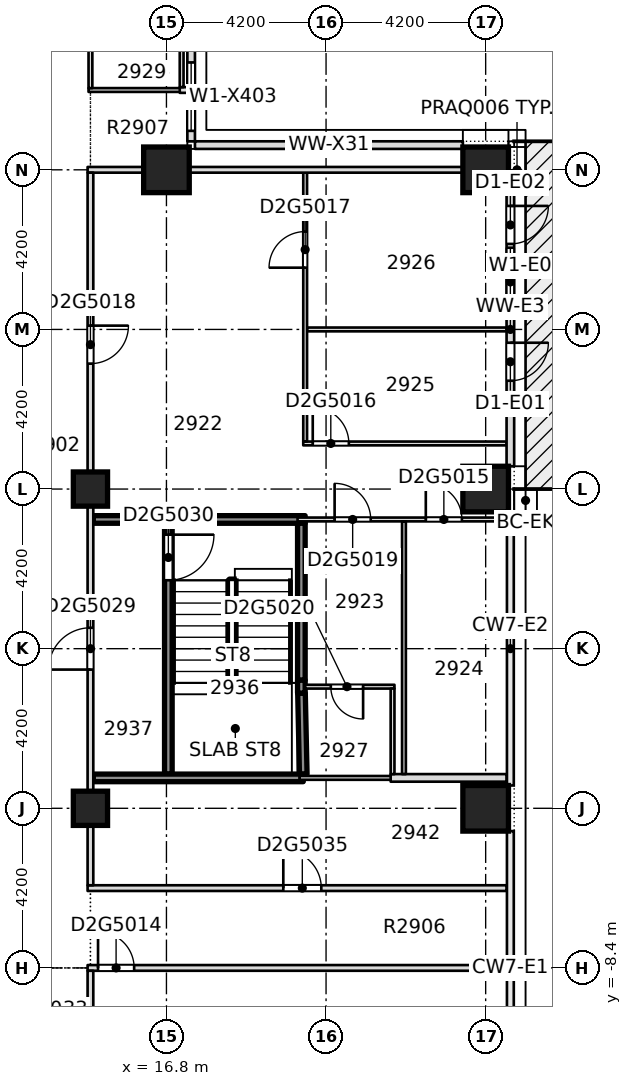
"""IFC4 building model, lengths in metres.
Left out: names, types, materials, properties, quantities, classifications, styles, units other than length and angle.
Written with IfcOpenShell. Run it as: python <this file> out.ifc"""

import sys

from ifc_helpers import new_model, si_unit, direction, frame, frame_2d, origin, origin_2d, place, context, subcontext, project, spatial, rectangle, extrude, element, fill, save


model = new_model("IFC4")
c1 = context("Model", 3, precision=1e-05, world=origin(), true_north=direction((0.0, 1.0)))
c2 = subcontext(c1, "Body", "Model", "MODEL_VIEW")
j1 = project(units=[si_unit("LENGTHUNIT", "METRE"), si_unit("PLANEANGLEUNIT", "RADIAN")], contexts=[c1])
p1 = place(None, origin())
s1 = spatial("IfcSite", under=j1, at=p1, CompositionType="ELEMENT")
p2 = place(p1, origin())
s2 = spatial("IfcBuilding", under=s1, at=p2, CompositionType="ELEMENT")
p3 = place(p2, frame((0.0, 0.0, 114.9)))
s3 = spatial("IfcBuildingStorey", under=s2, at=p3, CompositionType="ELEMENT", Elevation=114.9)
for number, where, z_axis, x_axis in (
    (1, (25.2, -4.2, -0.32), (0.0, 0.0, 1.0), (1.0, 0.0, 0.0)),
    (2, (25.2, 4.2, -0.32), (0.0, 0.0, 1.0), (1.0, 0.0, 0.0)),
    (3, (16.8, 12.6, -0.32), (0.0, 0.0, 1.0), (1.0, 0.0, 0.0)),
    (4, (25.2, 12.6, -0.32), (0.0, 0.0, 1.0), (1.0, 0.0, 0.0)),
):
    element("IfcColumn", number, at=place(p3, frame(where, z_axis=z_axis, x_axis=x_axis)), inside=s3, PredefinedType="COLUMN", context=c2, shape_type="SweptSolid", body=[
        extrude(rectangle(XDim=1.2, YDim=1.2, at=origin_2d()), origin(), (0.0, 0.0, 1.0), 3.45),
    ])
for number, where, z_axis, x_axis in (
    (5, (14.8, -4.2, -0.32), (0.0, 0.0, 1.0), (1.0, 0.0, 0.0)),
    (6, (14.8, 4.2, -0.32), (0.0, 0.0, 1.0), (1.0, 0.0, 0.0)),
):
    element("IfcColumn", number, at=place(p3, frame(where, z_axis=z_axis, x_axis=x_axis)), inside=s3, PredefinedType="COLUMN", context=c2, shape_type="SweptSolid", body=[
        extrude(rectangle(XDim=0.9, YDim=0.9, at=origin_2d()), origin(), (0.0, 0.0, 1.0), 3.45),
    ])
p4 = place(p3, frame((14.725, -8.4, 0.0), z_axis=(0.0, 0.0, 1.0), x_axis=(1.0, 0.0, 0.0)))
e7 = element("IfcWall", 7, at=p4, inside=s3, PredefinedType="PARTITIONING", context=c2, shape_type="SweptSolid", body=[
    extrude(rectangle(XDim=11.025, YDim=0.15, at=frame_2d((5.512, 0.0))), origin(), (0.0, 0.0, 1.0), 3.13),
])
p5 = place(p4, frame((0.275, 0.0, 0.0)))
e8 = element("IfcOpeningElement", 8, at=p5, cuts=e7, PredefinedType="OPENING", context=c2, shape_type="SweptSolid", body=[
    extrude(rectangle(XDim=0.95, YDim=2.1, at=frame_2d((0.475, 1.05))), frame((0.0, 0.085, 0.0), z_axis=(0.0, -1.0, 0.0), x_axis=(1.0, 0.0, 0.0)), (0.0, 0.0, 1.0), 0.17),
])
p6 = place(p3, frame((14.725, -6.3, 0.0), z_axis=(0.0, 0.0, 1.0), x_axis=(1.0, 0.0, 0.0)))
e9 = element("IfcWall", 9, at=p6, inside=s3, PredefinedType="PARTITIONING", context=c2, shape_type="SweptSolid", body=[
    extrude(rectangle(XDim=11.025, YDim=0.15, at=frame_2d((5.512, 0.0))), origin(), (0.0, 0.0, 1.0), 3.13),
])
p7 = place(p6, frame((5.15, 0.0, 0.0)))
e10 = element("IfcOpeningElement", 10, at=p7, cuts=e9, PredefinedType="OPENING", context=c2, shape_type="SweptSolid", body=[
    extrude(rectangle(XDim=1.0, YDim=2.1, at=frame_2d((0.5, 1.05))), frame((0.0, 0.085, 0.0), z_axis=(0.0, -1.0, 0.0), x_axis=(1.0, 0.0, 0.0)), (0.0, 0.0, 1.0), 0.17),
])
p8 = place(p3, frame((20.3, -3.4, 0.0), z_axis=(0.0, 0.0, 1.0), x_axis=(1.0, 0.0, 0.0)))
e11 = element("IfcWall", 11, at=p8, inside=s3, PredefinedType="PARTITIONING", context=c2, shape_type="SweptSolid", body=[
    extrude(rectangle(XDim=2.5, YDim=0.1, at=frame_2d((1.25, 0.0))), origin(), (0.0, 0.0, 1.0), 3.13),
])
p9 = place(p3, frame((22.7, -3.4, 0.0), z_axis=(0.0, 0.0, 1.0), x_axis=(1.0, 0.0, 0.0)))
e12 = element("IfcWall", 12, at=p9, inside=s3, PredefinedType="PARTITIONING", context=c2, shape_type="SweptSolid", body=[
    extrude(rectangle(XDim=3.05, YDim=0.2, at=frame_2d((1.525, 0.0))), origin(), (0.0, 0.0, 1.0), 3.13),
])
p10 = place(p3, frame((20.45, -1.0, 0.0), z_axis=(0.0, 0.0, 1.0), x_axis=(1.0, 0.0, 0.0)))
e13 = element("IfcWall", 13, at=p10, inside=s3, PredefinedType="PARTITIONING", context=c2, shape_type="SweptSolid", body=[
    extrude(rectangle(XDim=2.35, YDim=0.1, at=frame_2d((1.175, 0.0))), origin(), (0.0, 0.0, 1.0), 3.13),
])
p11 = place(p10, frame((0.675, 0.0, 0.0)))
e14 = element("IfcOpeningElement", 14, at=p11, cuts=e13, PredefinedType="OPENING", context=c2, shape_type="SweptSolid", body=[
    extrude(rectangle(XDim=0.85, YDim=2.1, at=frame_2d((0.425, 1.05))), frame((0.0, 0.06, 0.0), z_axis=(0.0, -1.0, 0.0), x_axis=(1.0, 0.0, 0.0)), (0.0, 0.0, 1.0), 0.12),
])
p12 = place(p3, frame((14.875, 3.4, 0.0), z_axis=(0.0, 0.0, 1.0), x_axis=(1.0, 0.0, 0.0)))
e15 = element("IfcWall", 15, at=p12, inside=s3, PredefinedType="SOLIDWALL", context=c2, shape_type="SweptSolid", body=[
    extrude(rectangle(XDim=5.575, YDim=0.2, at=frame_2d((2.788, 0.0))), origin(), (0.0, 0.0, 1.0), 3.13),
])
p13 = place(p3, frame((20.25, 3.4, 0.0), z_axis=(0.0, 0.0, 1.0), x_axis=(1.0, 0.0, 0.0)))
e16 = element("IfcWall", 16, at=p13, inside=s3, PredefinedType="PARTITIONING", context=c2, shape_type="SweptSolid", body=[
    extrude(rectangle(XDim=5.5, YDim=0.1, at=frame_2d((2.75, 0.0))), origin(), (0.0, 0.0, 1.0), 3.13),
])
p14 = place(p13, frame((3.375, 0.0, 0.0)))
e17 = element("IfcOpeningElement", 17, at=p14, cuts=e16, PredefinedType="OPENING", context=c2, shape_type="SweptSolid", body=[
    extrude(rectangle(XDim=0.95, YDim=2.1, at=frame_2d((0.475, 1.05))), frame((0.0, 0.06, 0.0), z_axis=(0.0, -1.0, 0.0), x_axis=(1.0, 0.0, 0.0)), (0.0, 0.0, 1.0), 0.12),
])
p15 = place(p13, frame((0.975, 0.0, 0.0)))
e18 = element("IfcOpeningElement", 18, at=p15, cuts=e16, PredefinedType="OPENING", context=c2, shape_type="SweptSolid", body=[
    extrude(rectangle(XDim=0.95, YDim=2.1, at=frame_2d((0.475, 1.05))), frame((0.0, 0.06, 0.0), z_axis=(0.0, -1.0, 0.0), x_axis=(1.0, 0.0, 0.0)), (0.0, 0.0, 1.0), 0.12),
])
p16 = place(p3, frame((20.4, 5.4, 0.0), z_axis=(0.0, 0.0, 1.0), x_axis=(1.0, 0.0, 0.0)))
e19 = element("IfcWall", 19, at=p16, inside=s3, PredefinedType="PARTITIONING", context=c2, shape_type="SweptSolid", body=[
    extrude(rectangle(XDim=5.35, YDim=0.1, at=frame_2d((2.675, 0.0))), origin(), (0.0, 0.0, 1.0), 3.13),
])
p17 = place(p16, frame((0.25, 0.0, 0.0)))
e20 = element("IfcOpeningElement", 20, at=p17, cuts=e19, PredefinedType="OPENING", context=c2, shape_type="SweptSolid", body=[
    extrude(rectangle(XDim=0.95, YDim=2.1, at=frame_2d((0.475, 1.05))), frame((0.0, 0.06, 0.0), z_axis=(0.0, -1.0, 0.0), x_axis=(1.0, 0.0, 0.0)), (0.0, 0.0, 1.0), 0.12),
])
p18 = place(p3, frame((20.5, 8.4, 0.0), z_axis=(0.0, 0.0, 1.0), x_axis=(1.0, 0.0, 0.0)))
e21 = element("IfcWall", 21, at=p18, inside=s3, PredefinedType="PARTITIONING", context=c2, shape_type="SweptSolid", body=[
    extrude(rectangle(XDim=5.25, YDim=0.1, at=frame_2d((2.625, 0.0))), origin(), (0.0, 0.0, 1.0), 3.13),
])
p19 = place(p3, frame((14.725, 12.6, 0.0), z_axis=(0.0, 0.0, 1.0), x_axis=(1.0, 0.0, 0.0)))
e22 = element("IfcWall", 22, at=p19, inside=s3, PredefinedType="PARTITIONING", context=c2, shape_type="SweptSolid", body=[
    extrude(rectangle(XDim=2.675, YDim=0.15, at=frame_2d((1.337, 0.0))), origin(), (0.0, 0.0, 1.0), 3.13),
])
p20 = place(p3, frame((14.75, 14.7, 0.0), z_axis=(0.0, 0.0, 1.0), x_axis=(1.0, 0.0, 0.0)))
e23 = element("IfcWall", 23, at=p20, inside=s3, PredefinedType="PARTITIONING", context=c2, shape_type="SweptSolid", body=[
    extrude(rectangle(XDim=2.5, YDim=0.1, at=frame_2d((1.25, 0.0))), origin(), (0.0, 0.0, 1.0), 3.13),
])
p21 = place(p3, frame((17.15, 14.7, 0.0), z_axis=(0.0, 0.0, 1.0), x_axis=(1.0, 0.0, 0.0)))
e24 = element("IfcWall", 24, at=p21, inside=s3, PredefinedType="PARTITIONING", context=c2, shape_type="SweptSolid", body=[
    extrude(rectangle(XDim=0.2, YDim=0.15, at=frame_2d((0.1, 0.0))), origin(), (0.0, 0.0, 1.0), 3.13),
])
p22 = place(p3, frame((14.8, -10.525, 0.0), z_axis=(0.0, 0.0, 1.0), x_axis=(0.0, 1.0, 0.0)))
e25 = element("IfcWall", 25, at=p22, inside=s3, PredefinedType="PARTITIONING", context=c2, shape_type="SweptSolid", body=[
    extrude(rectangle(XDim=2.05, YDim=0.15, at=frame_2d((1.025, 0.0))), origin(), (0.0, 0.0, 1.0), 3.13),
])
p23 = place(p3, frame((14.8, -6.225, 0.0), z_axis=(0.0, 0.0, 1.0), x_axis=(0.0, 1.0, 0.0)))
e26 = element("IfcWall", 26, at=p23, inside=s3, PredefinedType="PARTITIONING", context=c2, shape_type="SweptSolid", body=[
    extrude(rectangle(XDim=18.75, YDim=0.15, at=frame_2d((9.375, 0.0))), origin(), (0.0, 0.0, 1.0), 3.13),
])
p24 = place(p23, frame((13.725, 0.0, 0.0)))
e27 = element("IfcOpeningElement", 27, at=p24, cuts=e26, PredefinedType="OPENING", context=c2, shape_type="SweptSolid", body=[
    extrude(rectangle(XDim=1.0, YDim=2.1, at=frame_2d((0.5, 1.05))), frame((0.0, 0.085, 0.0), z_axis=(0.0, -1.0, 0.0), x_axis=(1.0, 0.0, 0.0)), (0.0, 0.0, 1.0), 0.17),
])
p25 = place(p23, frame((5.675, 0.0, 0.0)))
e28 = element("IfcOpeningElement", 28, at=p25, cuts=e26, PredefinedType="OPENING", context=c2, shape_type="SweptSolid", body=[
    extrude(rectangle(XDim=1.1, YDim=2.1, at=frame_2d((0.55, 1.05))), frame((0.0, 0.085, 0.0), z_axis=(0.0, -1.0, 0.0), x_axis=(1.0, 0.0, 0.0)), (0.0, 0.0, 1.0), 0.17),
])
p26 = place(p3, frame((14.8, 14.75, 0.0), z_axis=(0.0, 0.0, 1.0), x_axis=(0.0, 1.0, 0.0)))
e29 = element("IfcWall", 29, at=p26, inside=s3, PredefinedType="PARTITIONING", context=c2, shape_type="SweptSolid", body=[
    extrude(rectangle(XDim=1.7, YDim=0.1, at=frame_2d((0.85, 0.0))), origin(), (0.0, 0.0, 1.0), 3.13),
])
p27 = place(p3, frame((16.85, -3.3, 0.0), z_axis=(0.0, 0.0, 1.0), x_axis=(0.0, 1.0, 0.0)))
e30 = element("IfcWall", 30, at=p27, inside=s3, PredefinedType="SOLIDWALL", context=c2, shape_type="SweptSolid", body=[
    extrude(rectangle(XDim=6.6, YDim=0.2, at=frame_2d((3.3, 0.0))), origin(), (0.0, 0.0, 1.0), 3.13),
])
p28 = place(p27, frame((5.1, 0.0, 0.0)))
e31 = element("IfcOpeningElement", 31, at=p28, cuts=e30, PredefinedType="OPENING", context=c2, shape_type="SweptSolid", body=[
    extrude(rectangle(XDim=1.2, YDim=2.1, at=frame_2d((0.6, 1.05))), frame((0.0, 0.11, 0.0), z_axis=(0.0, -1.0, 0.0), x_axis=(1.0, 0.0, 0.0)), (0.0, 0.0, 1.0), 0.22),
])
p29 = place(p3, frame((17.2, 14.775, 0.0), z_axis=(0.0, 0.0, 1.0), x_axis=(0.0, 1.0, 0.0)))
e32 = element("IfcWall", 32, at=p29, inside=s3, PredefinedType="PARTITIONING", context=c2, shape_type="SweptSolid", body=[
    extrude(rectangle(XDim=1.675, YDim=0.1, at=frame_2d((0.837, 0.0))), origin(), (0.0, 0.0, 1.0), 3.13),
])
p30 = place(p3, frame((20.4, -3.3, 0.0), z_axis=(0.0, 0.0, 1.0), x_axis=(-0.021771342749, 0.999762976227, 0.0)))
e33 = element("IfcWall", 33, at=p30, inside=s3, PredefinedType="SOLIDWALL", context=c2, shape_type="SweptSolid", body=[
    extrude(rectangle(XDim=2.131, YDim=0.2, at=frame_2d((1.065, 0.0))), origin(), (0.0, 0.0, 1.0), 3.13),
])
p31 = place(p3, frame((20.35, -0.83, 0.0), z_axis=(0.0, 0.0, 1.0), x_axis=(0.0, 1.0, 0.0)))
e34 = element("IfcWall", 34, at=p31, inside=s3, PredefinedType="SOLIDWALL", context=c2, shape_type="SweptSolid", body=[
    extrude(rectangle(XDim=4.13, YDim=0.2, at=frame_2d((2.065, 0.0))), origin(), (0.0, 0.0, 1.0), 3.13),
])
p32 = place(p3, frame((20.45, 5.45, 0.0), z_axis=(0.0, 0.0, 1.0), x_axis=(0.0, 1.0, 0.0)))
e35 = element("IfcWall", 35, at=p32, inside=s3, PredefinedType="PARTITIONING", context=c2, shape_type="SweptSolid", body=[
    extrude(rectangle(XDim=7.075, YDim=0.1, at=frame_2d((3.538, 0.0))), origin(), (0.0, 0.0, 1.0), 3.13),
])
p33 = place(p32, frame((4.575, 0.0, 0.0)))
e36 = element("IfcOpeningElement", 36, at=p33, cuts=e35, PredefinedType="OPENING", context=c2, shape_type="SweptSolid", body=[
    extrude(rectangle(XDim=0.95, YDim=2.1, at=frame_2d((0.475, 1.05))), frame((0.0, 0.06, 0.0), z_axis=(0.0, -1.0, 0.0), x_axis=(1.0, 0.0, 0.0)), (0.0, 0.0, 1.0), 0.12),
])
p34 = place(p3, frame((22.75, -3.3, 0.0), z_axis=(0.0, 0.0, 1.0), x_axis=(0.0, 1.0, 0.0)))
e37 = element("IfcWall", 37, at=p34, inside=s3, PredefinedType="PARTITIONING", context=c2, shape_type="SweptSolid", body=[
    extrude(rectangle(XDim=2.25, YDim=0.1, at=frame_2d((1.125, 0.0))), origin(), (0.0, 0.0, 1.0), 3.13),
])
p35 = place(p3, frame((23.05, -3.3, 0.0), z_axis=(0.0, 0.0, 1.0), x_axis=(0.0, 1.0, 0.0)))
e38 = element("IfcWall", 38, at=p35, inside=s3, PredefinedType="PARTITIONING", context=c2, shape_type="SweptSolid", body=[
    extrude(rectangle(XDim=6.65, YDim=0.1, at=frame_2d((3.325, 0.0))), origin(), (0.0, 0.0, 1.0), 3.13),
])
p36 = place(p3, frame((25.85, 4.8, 0.0), z_axis=(0.0, 0.0, 1.0), x_axis=(0.0, 1.0, 0.0)))
e39 = element("IfcWall", 39, at=p36, inside=s3, PredefinedType="STANDARD", context=c2, shape_type="SweptSolid", body=[
    extrude(rectangle(XDim=7.2, YDim=0.2, at=frame_2d((3.6, 0.0))), origin(), (0.0, 0.0, 1.0), 3.13),
])
p37 = place(p36, frame((2.25, 0.0, 0.0)))
e40 = element("IfcOpeningElement", 40, at=p37, cuts=e39, PredefinedType="OPENING", context=c2, shape_type="SweptSolid", body=[
    extrude(rectangle(XDim=1.0, YDim=2.4, at=frame_2d((0.5, 1.2))), frame((0.0, 0.11, 0.0), z_axis=(0.0, -1.0, 0.0), x_axis=(1.0, 0.0, 0.0)), (0.0, 0.0, 1.0), 0.22),
])
p38 = place(p36, frame((3.95, 0.0, 0.2)))
e41 = element("IfcOpeningElement", 41, at=p38, cuts=e39, PredefinedType="OPENING", context=c2, shape_type="SweptSolid", body=[
    extrude(rectangle(XDim=1.8, YDim=2.65, at=frame_2d((0.9, 1.325))), frame((0.0, 0.11, 0.0), z_axis=(0.0, -1.0, 0.0), x_axis=(1.0, 0.0, 0.0)), (0.0, 0.0, 1.0), 0.22),
])
p39 = place(p36, frame((5.85, 0.0, 0.0)))
e42 = element("IfcOpeningElement", 42, at=p39, cuts=e39, PredefinedType="OPENING", context=c2, shape_type="SweptSolid", body=[
    extrude(rectangle(XDim=1.0, YDim=2.4, at=frame_2d((0.5, 1.2))), frame((0.0, 0.11, 0.0), z_axis=(0.0, -1.0, 0.0), x_axis=(1.0, 0.0, 0.0)), (0.0, 0.0, 1.0), 0.22),
])
p40 = place(p3, frame((24.6, 13.25, 0.0), z_axis=(0.0, 0.0, 1.0), x_axis=(-1.0, 0.0, 0.0)))
e43 = element("IfcWall", 43, at=p40, inside=s3, PredefinedType="STANDARD", context=c2, shape_type="SweptSolid", body=[
    extrude(rectangle(XDim=7.05, YDim=0.2, at=frame_2d((3.525, 0.0))), origin(), (0.0, 0.0, 1.0), 3.13),
])
p41 = place(p3, frame((17.45, 13.35, 0.0), z_axis=(0.0, 0.0, 1.0), x_axis=(0.0, 1.0, 0.0)))
e44 = element("IfcWall", 44, at=p41, inside=s3, PredefinedType="STANDARD", context=c2, shape_type="SweptSolid", body=[
    extrude(rectangle(XDim=7.05, YDim=0.2, at=frame_2d((3.525, 0.0))), origin(), (0.0, 0.0, 1.0), 3.13),
])
p42 = place(p41, frame((0.275, 0.0, 0.2)))
e45 = element("IfcOpeningElement", 45, at=p42, cuts=e44, PredefinedType="OPENING", context=c2, shape_type="SweptSolid", body=[
    extrude(rectangle(XDim=1.8, YDim=2.65, at=frame_2d((0.9, 1.325))), frame((0.0, 0.11, 0.0), z_axis=(0.0, -1.0, 0.0), x_axis=(1.0, 0.0, 0.0)), (0.0, 0.0, 1.0), 0.22),
])
p43 = place(p41, frame((3.8, 0.0, 0.2)))
e46 = element("IfcOpeningElement", 46, at=p43, cuts=e44, PredefinedType="OPENING", context=c2, shape_type="SweptSolid", body=[
    extrude(rectangle(XDim=1.8, YDim=2.65, at=frame_2d((0.9, 1.325))), frame((0.0, 0.11, 0.0), z_axis=(0.0, -1.0, 0.0), x_axis=(1.0, 0.0, 0.0)), (0.0, 0.0, 1.0), 0.22),
])
p44 = place(p3, frame((20.35, -1.17, 0.0), z_axis=(0.0, 0.0, 1.0), x_axis=(0.0, 1.0, 0.0)))
e47 = element("IfcWall", 47, at=p44, inside=s3, PredefinedType="SOLIDWALL", context=c2, shape_type="SweptSolid", body=[
    extrude(rectangle(XDim=0.34, YDim=0.2, at=frame_2d((0.17, 0.0))), origin(), (0.0, 0.0, 1.0), 3.13),
])
p45 = place(p3, frame((14.875, -3.4, 0.0), z_axis=(0.0, 0.0, 1.0), x_axis=(1.0, 0.0, 0.0)))
e48 = element("IfcWall", 48, at=p45, inside=s3, PredefinedType="SOLIDWALL", context=c2, shape_type="SweptSolid", body=[
    extrude(rectangle(XDim=5.525, YDim=0.2, at=frame_2d((2.762, 0.0))), origin(), (0.0, 0.0, 1.0), 3.13),
])
p46 = place(p3, frame((17.4, 12.6, 0.0), z_axis=(0.0, 0.0, 1.0), x_axis=(1.0, 0.0, 0.0)))
e49 = element("IfcWall", 49, at=p46, inside=s3, PredefinedType="PARTITIONING", context=c2, shape_type="SweptSolid", body=[
    extrude(rectangle(XDim=7.2, YDim=0.15, at=frame_2d((3.6, 0.0))), origin(), (0.0, 0.0, 1.0), 2.58),
])
p47 = place(p3, frame((24.6, 12.6, 0.0), z_axis=(0.0, 0.0, 1.0), x_axis=(1.0, 0.0, 0.0)))
e50 = element("IfcWall", 50, at=p47, inside=s3, PredefinedType="PARTITIONING", context=c2, shape_type="SweptSolid", body=[
    extrude(rectangle(XDim=1.15, YDim=0.15, at=frame_2d((0.575, 0.0))), origin(), (0.0, 0.0, 1.0), 3.13),
])
p48 = place(p5, origin())
e51 = element("IfcDoor", 51, at=p48, inside=s3, OperationType="SINGLE_SWING_RIGHT", PredefinedType="DOOR", context=c2, shape_type="SweptSolid", body=[
    extrude(rectangle(XDim=0.95, YDim=2.1, at=frame_2d((0.475, 1.05))), frame((0.0, 0.025, 0.0), z_axis=(0.0, -1.0, 0.0), x_axis=(1.0, 0.0, 0.0)), (0.0, 0.0, 1.0), 0.05),
])
fill(e8, e51)
p49 = place(p14, origin())
e52 = element("IfcDoor", 52, at=p49, inside=s3, OperationType="SINGLE_SWING_RIGHT", PredefinedType="DOOR", context=c2, shape_type="SweptSolid", body=[
    extrude(rectangle(XDim=0.95, YDim=2.1, at=frame_2d((0.475, 1.05))), frame((0.0, 0.025, 0.0), z_axis=(0.0, -1.0, 0.0), x_axis=(1.0, 0.0, 0.0)), (0.0, 0.0, 1.0), 0.05),
])
fill(e17, e52)
p50 = place(p17, origin())
e53 = element("IfcDoor", 53, at=p50, inside=s3, OperationType="SINGLE_SWING_LEFT", PredefinedType="DOOR", context=c2, shape_type="SweptSolid", body=[
    extrude(rectangle(XDim=0.95, YDim=2.1, at=frame_2d((0.475, 1.05))), frame((0.0, 0.025, 0.0), z_axis=(0.0, -1.0, 0.0), x_axis=(1.0, 0.0, 0.0)), (0.0, 0.0, 1.0), 0.05),
])
fill(e20, e53)
p51 = place(p33, origin())
e54 = element("IfcDoor", 54, at=p51, inside=s3, OperationType="SINGLE_SWING_RIGHT", PredefinedType="DOOR", context=c2, shape_type="SweptSolid", body=[
    extrude(rectangle(XDim=0.95, YDim=2.1, at=frame_2d((0.475, 1.05))), frame((0.0, 0.025, 0.0), z_axis=(0.0, -1.0, 0.0), x_axis=(1.0, 0.0, 0.0)), (0.0, 0.0, 1.0), 0.05),
])
fill(e36, e54)
p52 = place(p24, origin())
e55 = element("IfcDoor", 55, at=p52, inside=s3, OperationType="SINGLE_SWING_RIGHT", PredefinedType="DOOR", context=c2, shape_type="SweptSolid", body=[
    extrude(rectangle(XDim=1.0, YDim=2.1, at=frame_2d((0.5, 1.05))), frame((0.0, 0.025, 0.0), z_axis=(0.0, -1.0, 0.0), x_axis=(1.0, 0.0, 0.0)), (0.0, 0.0, 1.0), 0.05),
])
fill(e27, e55)
p53 = place(p15, origin())
e56 = element("IfcDoor", 56, at=p53, inside=s3, OperationType="SINGLE_SWING_RIGHT", PredefinedType="DOOR", context=c2, shape_type="SweptSolid", body=[
    extrude(rectangle(XDim=0.95, YDim=2.1, at=frame_2d((0.475, 1.05))), frame((0.0, 0.025, 0.0), z_axis=(0.0, -1.0, 0.0), x_axis=(1.0, 0.0, 0.0)), (0.0, 0.0, 1.0), 0.05),
])
fill(e18, e56)
p54 = place(p11, origin())
e57 = element("IfcDoor", 57, at=p54, inside=s3, OperationType="SINGLE_SWING_RIGHT", PredefinedType="DOOR", context=c2, shape_type="SweptSolid", body=[
    extrude(rectangle(XDim=0.85, YDim=2.1, at=frame_2d((0.425, 1.05))), frame((0.0, 0.025, 0.0), z_axis=(0.0, -1.0, 0.0), x_axis=(1.0, 0.0, 0.0)), (0.0, 0.0, 1.0), 0.05),
])
fill(e14, e57)
p55 = place(p25, origin())
e58 = element("IfcDoor", 58, at=p55, inside=s3, OperationType="SINGLE_SWING_LEFT", PredefinedType="DOOR", context=c2, shape_type="SweptSolid", body=[
    extrude(rectangle(XDim=1.1, YDim=2.1, at=frame_2d((0.55, 1.05))), frame((0.0, 0.025, 0.0), z_axis=(0.0, -1.0, 0.0), x_axis=(1.0, 0.0, 0.0)), (0.0, 0.0, 1.0), 0.05),
])
fill(e28, e58)
p56 = place(p28, origin())
e59 = element("IfcDoor", 59, at=p56, inside=s3, OperationType="SINGLE_SWING_LEFT", PredefinedType="DOOR", context=c2, shape_type="SweptSolid", body=[
    extrude(rectangle(XDim=1.2, YDim=2.1, at=frame_2d((0.6, 1.05))), frame((0.0, 0.025, 0.0), z_axis=(0.0, -1.0, 0.0), x_axis=(1.0, 0.0, 0.0)), (0.0, 0.0, 1.0), 0.05),
])
fill(e31, e59)
p57 = place(p7, origin())
e60 = element("IfcDoor", 60, at=p57, inside=s3, OperationType="SINGLE_SWING_RIGHT", PredefinedType="DOOR", context=c2, shape_type="SweptSolid", body=[
    extrude(rectangle(XDim=1.0, YDim=2.1, at=frame_2d((0.5, 1.05))), frame((0.0, 0.025, 0.0), z_axis=(0.0, -1.0, 0.0), x_axis=(1.0, 0.0, 0.0)), (0.0, 0.0, 1.0), 0.05),
])
fill(e10, e60)
p58 = place(p37, origin())
e61 = element("IfcDoor", 61, at=p58, inside=s3, OperationType="SINGLE_SWING_LEFT", PredefinedType="DOOR", context=c2, shape_type="SweptSolid", body=[
    extrude(rectangle(XDim=1.0, YDim=2.4, at=frame_2d((0.5, 1.2))), frame((0.0, 0.025, 0.0), z_axis=(0.0, -1.0, 0.0), x_axis=(1.0, 0.0, 0.0)), (0.0, 0.0, 1.0), 0.05),
])
fill(e40, e61)
p59 = place(p38, origin())
e62 = element("IfcWindow", 62, at=p59, inside=s3, PartitioningType="SINGLE_PANEL", PredefinedType="WINDOW", context=c2, shape_type="SweptSolid", body=[
    extrude(rectangle(XDim=1.8, YDim=2.65, at=frame_2d((0.9, 1.325))), frame((0.0, 0.03, 0.0), z_axis=(0.0, -1.0, 0.0), x_axis=(1.0, 0.0, 0.0)), (0.0, 0.0, 1.0), 0.06),
])
fill(e41, e62)
p60 = place(p39, origin())
e63 = element("IfcDoor", 63, at=p60, inside=s3, OperationType="SINGLE_SWING_LEFT", PredefinedType="DOOR", context=c2, shape_type="SweptSolid", body=[
    extrude(rectangle(XDim=1.0, YDim=2.4, at=frame_2d((0.5, 1.2))), frame((0.0, 0.025, 0.0), z_axis=(0.0, -1.0, 0.0), x_axis=(1.0, 0.0, 0.0)), (0.0, 0.0, 1.0), 0.05),
])
fill(e42, e63)
p61 = place(p42, origin())
e64 = element("IfcWindow", 64, at=p61, inside=s3, PartitioningType="SINGLE_PANEL", PredefinedType="WINDOW", context=c2, shape_type="SweptSolid", body=[
    extrude(rectangle(XDim=1.8, YDim=2.65, at=frame_2d((0.9, 1.325))), frame((0.0, 0.03, 0.0), z_axis=(0.0, -1.0, 0.0), x_axis=(1.0, 0.0, 0.0)), (0.0, 0.0, 1.0), 0.06),
])
fill(e45, e64)
save(model, sys.argv[1])
